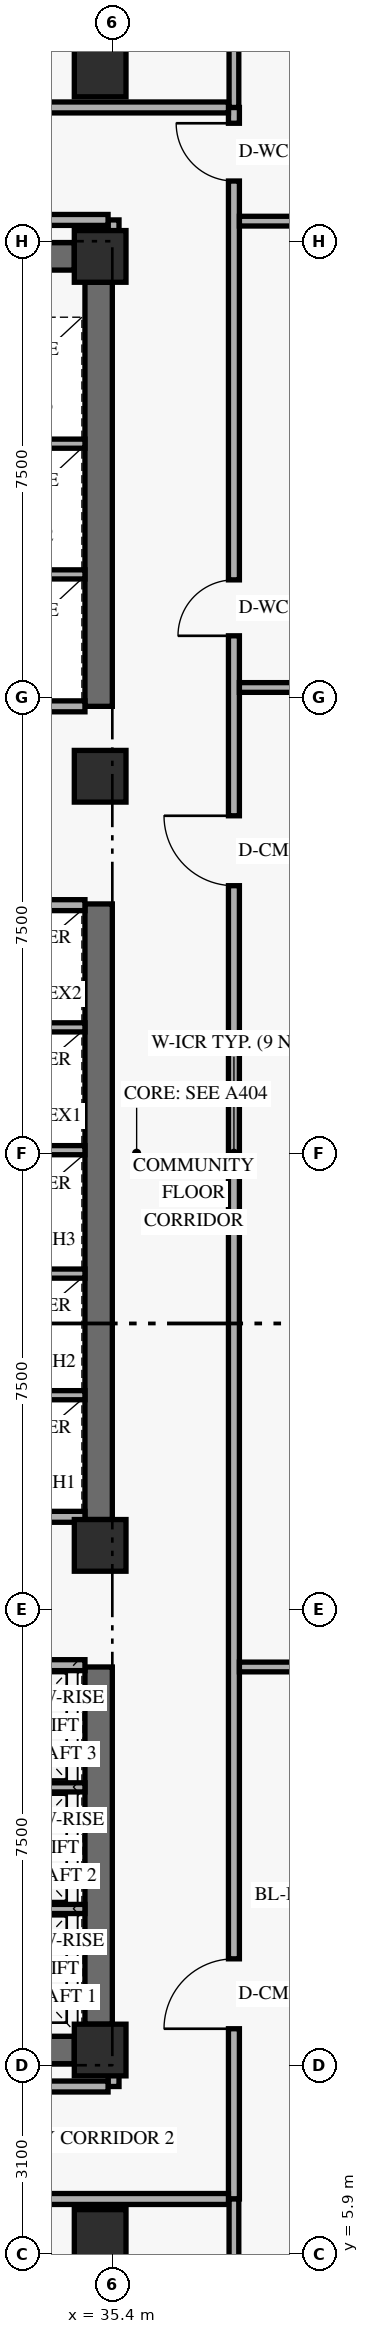
"""IFC4 building model, lengths in metres.
Left out: names, types, materials, properties, quantities, classifications, styles, units other than length and angle.
Written with IfcOpenShell. Run it as: python <this file> out.ifc"""

import sys

from ifc_helpers import new_model, si_unit, direction, frame, frame_2d, origin, origin_2d, place, context, subcontext, project, spatial, rectangle, extrude, element, fill, save


model = new_model("IFC4")
c1 = context("Model", 3, precision=1e-05, world=origin(), true_north=direction((0.0, 1.0)))
c2 = subcontext(c1, "Body", "Model", "MODEL_VIEW")
j1 = project(units=[si_unit("LENGTHUNIT", "METRE"), si_unit("PLANEANGLEUNIT", "RADIAN")], contexts=[c1])
p1 = place(None, origin())
s1 = spatial("IfcSite", under=j1, at=p1, CompositionType="ELEMENT")
p2 = place(p1, origin())
s2 = spatial("IfcBuilding", under=s1, at=p2, CompositionType="ELEMENT")
p3 = place(p2, frame((0.0, 0.0, 60.0)))
s3 = spatial("IfcBuildingStorey", under=s2, at=p3, CompositionType="ELEMENT", Elevation=60.0)
p4 = place(p3, frame((35.175, 9.675, 0.0), z_axis=(0.0, 0.0, 1.0), x_axis=(0.0, 1.0, 0.0)))
e1 = element("IfcWall", 1, at=p4, inside=s3, PredefinedType="SHEAR", context=c2, shape_type="SweptSolid", body=[
    extrude(rectangle(XDim=5.875, YDim=0.45, at=frame_2d((2.938, 0.0))), origin(), (0.0, 0.0, 1.0), 3.267),
])
p5 = place(p3, frame((35.175, 17.975, 0.0), z_axis=(0.0, 0.0, 1.0), x_axis=(0.0, 1.0, 0.0)))
e2 = element("IfcWall", 2, at=p5, inside=s3, PredefinedType="SHEAR", context=c2, shape_type="SweptSolid", body=[
    extrude(rectangle(XDim=10.125, YDim=0.45, at=frame_2d((5.062, 0.0))), origin(), (0.0, 0.0, 1.0), 3.267),
])
p6 = place(p3, frame((35.175, 31.35, 0.0), z_axis=(0.0, 0.0, 1.0), x_axis=(0.0, 1.0, 0.0)))
e3 = element("IfcWall", 3, at=p6, inside=s3, PredefinedType="SHEAR", context=c2, shape_type="SweptSolid", body=[
    extrude(rectangle(XDim=6.975, YDim=0.45, at=frame_2d((3.487, 0.0))), origin(), (0.0, 0.0, 1.0), 3.267),
])
for number, where, z_axis, x_axis in (
    (4, (24.625, 9.25, 0.0), (0.0, 0.0, 1.0), (1.0, 0.0, 0.0)),
    (5, (24.625, 38.75, 0.0), (0.0, 0.0, 1.0), (1.0, 0.0, 0.0)),
):
    element("IfcWall", number, at=place(p3, frame(where, z_axis=z_axis, x_axis=x_axis)), inside=s3, PredefinedType="SHEAR", context=c2, shape_type="SweptSolid", body=[
        extrude(rectangle(XDim=10.15, YDim=0.45, at=frame_2d((5.075, 0.0))), origin(), (0.0, 0.0, 1.0), 3.96),
    ])
for number, where, z_axis, x_axis in (
    (6, (35.2, 6.2, 0.0), (0.0, 0.0, 1.0), (1.0, 0.0, 0.0)),
    (7, (35.2, 9.25, 0.0), (0.0, 0.0, 1.0), (1.0, 0.0, 0.0)),
    (8, (35.2, 17.55, 0.0), (0.0, 0.0, 1.0), (1.0, 0.0, 0.0)),
    (9, (35.2, 30.2, 0.0), (0.0, 0.0, 1.0), (1.0, 0.0, 0.0)),
    (10, (35.2, 38.75, 0.0), (0.0, 0.0, 1.0), (1.0, 0.0, 0.0)),
    (11, (35.2, 41.8, 0.0), (0.0, 0.0, 1.0), (1.0, 0.0, 0.0)),
):
    element("IfcColumn", number, at=place(p3, frame(where, z_axis=z_axis, x_axis=x_axis)), inside=s3, PredefinedType="COLUMN", context=c2, shape_type="SweptSolid", body=[
        extrude(rectangle(XDim=0.85, YDim=0.85, at=origin_2d()), origin(), (0.0, 0.0, 1.0), 4.2),
    ])
p7 = place(p3, frame((32.74, 15.58, 0.0), z_axis=(0.0, 0.0, 1.0), x_axis=(1.0, 0.0, 0.0)))
e12 = element("IfcWall", 12, at=p7, inside=s3, PredefinedType="STANDARD", context=c2, shape_type="SweptSolid", body=[
    extrude(rectangle(XDim=2.21, YDim=0.18, at=frame_2d((1.105, 0.0))), origin(), (0.0, 0.0, 1.0), 3.96),
])
for number, where, z_axis, x_axis in (
    (13, (32.74, 11.57, 0.0), (0.0, 0.0, 1.0), (1.0, 0.0, 0.0)),
    (14, (32.74, 13.57, 0.0), (0.0, 0.0, 1.0), (1.0, 0.0, 0.0)),
):
    element("IfcWall", number, at=place(p3, frame(where, z_axis=z_axis, x_axis=x_axis)), inside=s3, PredefinedType="STANDARD", context=c2, shape_type="SweptSolid", body=[
        extrude(rectangle(XDim=2.21, YDim=0.15, at=frame_2d((1.105, 0.0))), origin(), (0.0, 0.0, 1.0), 3.96),
    ])
for number, where, z_axis, x_axis in (
    (15, (32.74, 18.02, 0.0), (0.0, 0.0, 1.0), (1.0, 0.0, 0.0)),
    (16, (32.74, 28.08, 0.0), (0.0, 0.0, 1.0), (1.0, 0.0, 0.0)),
):
    element("IfcWall", number, at=place(p3, frame(where, z_axis=z_axis, x_axis=x_axis)), inside=s3, PredefinedType="STANDARD", context=c2, shape_type="SweptSolid", body=[
        extrude(rectangle(XDim=2.21, YDim=0.18, at=frame_2d((1.105, 0.0))), origin(), (0.0, 0.0, 1.0), 3.96),
    ])
for number, where, z_axis, x_axis in (
    (17, (32.74, 20.02, 0.0), (0.0, 0.0, 1.0), (1.0, 0.0, 0.0)),
    (18, (32.74, 22.02, 0.0), (0.0, 0.0, 1.0), (1.0, 0.0, 0.0)),
    (19, (32.74, 24.05, 0.0), (0.0, 0.0, 1.0), (1.0, 0.0, 0.0)),
    (20, (32.74, 26.07, 0.0), (0.0, 0.0, 1.0), (1.0, 0.0, 0.0)),
):
    element("IfcWall", number, at=place(p3, frame(where, z_axis=z_axis, x_axis=x_axis)), inside=s3, PredefinedType="STANDARD", context=c2, shape_type="SweptSolid", body=[
        extrude(rectangle(XDim=2.21, YDim=0.15, at=frame_2d((1.105, 0.0))), origin(), (0.0, 0.0, 1.0), 3.96),
    ])
p8 = place(p3, frame((32.74, 31.35, 0.0), z_axis=(0.0, 0.0, 1.0), x_axis=(1.0, 0.0, 0.0)))
e21 = element("IfcWall", 21, at=p8, inside=s3, PredefinedType="STANDARD", context=c2, shape_type="SweptSolid", body=[
    extrude(rectangle(XDim=2.21, YDim=0.18, at=frame_2d((1.105, 0.0))), origin(), (0.0, 0.0, 1.0), 3.96),
])
for number, where, z_axis, x_axis in (
    (22, (32.74, 33.52, 0.0), (0.0, 0.0, 1.0), (1.0, 0.0, 0.0)),
    (23, (32.74, 35.67, 0.0), (0.0, 0.0, 1.0), (1.0, 0.0, 0.0)),
):
    element("IfcWall", number, at=place(p3, frame(where, z_axis=z_axis, x_axis=x_axis)), inside=s3, PredefinedType="STANDARD", context=c2, shape_type="SweptSolid", body=[
        extrude(rectangle(XDim=2.21, YDim=0.15, at=frame_2d((1.105, 0.0))), origin(), (0.0, 0.0, 1.0), 3.96),
    ])
p9 = place(p3, frame((37.4, 6.8, 0.0), z_axis=(0.0, 0.0, 1.0), x_axis=(0.0, 1.0, 0.0)))
e24 = element("IfcWall", 24, at=p9, inside=s3, PredefinedType="STANDARD", context=c2, shape_type="SweptSolid", body=[
    extrude(rectangle(XDim=34.4, YDim=0.18, at=frame_2d((17.2, 0.0))), origin(), (0.0, 0.0, 1.0), 3.249),
])
p10 = place(p9, frame((25.71, 0.0, 0.0)))
e25 = element("IfcOpeningElement", 25, at=p10, cuts=e24, PredefinedType="OPENING", context=c2, shape_type="SweptSolid", body=[
    extrude(rectangle(XDim=0.92, YDim=2.14, at=frame_2d((0.46, 1.07))), frame((0.0, 0.1, 0.0), z_axis=(0.0, -1.0, 0.0), x_axis=(1.0, 0.0, 0.0)), (0.0, 0.0, 1.0), 0.2),
])
p11 = place(p9, frame((33.19, 0.0, 0.0)))
e26 = element("IfcOpeningElement", 26, at=p11, cuts=e24, PredefinedType="OPENING", context=c2, shape_type="SweptSolid", body=[
    extrude(rectangle(XDim=0.95, YDim=2.14, at=frame_2d((0.475, 1.07))), frame((0.0, 0.1, 0.0), z_axis=(0.0, -1.0, 0.0), x_axis=(1.0, 0.0, 0.0)), (0.0, 0.0, 1.0), 0.2),
])
p12 = place(p9, frame((2.8, 0.0, 0.0)))
e27 = element("IfcOpeningElement", 27, at=p12, cuts=e24, PredefinedType="OPENING", context=c2, shape_type="SweptSolid", body=[
    extrude(rectangle(XDim=1.15, YDim=2.15, at=frame_2d((0.575, 1.075))), frame((0.0, 0.1, 0.0), z_axis=(0.0, -1.0, 0.0), x_axis=(1.0, 0.0, 0.0)), (0.0, 0.0, 1.0), 0.2),
])
p13 = place(p9, frame((21.6, 0.0, 0.0)))
e28 = element("IfcOpeningElement", 28, at=p13, cuts=e24, PredefinedType="OPENING", context=c2, shape_type="SweptSolid", body=[
    extrude(rectangle(XDim=1.15, YDim=2.15, at=frame_2d((0.575, 1.075))), frame((0.0, 0.1, 0.0), z_axis=(0.0, -1.0, 0.0), x_axis=(1.0, 0.0, 0.0)), (0.0, 0.0, 1.0), 0.2),
])
for number, where, z_axis, x_axis in (
    (29, (37.4, 1.29, 0.0), (0.0, 0.0, 1.0), (0.0, 1.0, 0.0)),
    (30, (37.4, 41.2, 0.0), (0.0, 0.0, 1.0), (0.0, 1.0, 0.0)),
):
    element("IfcWall", number, at=place(p3, frame(where, z_axis=z_axis, x_axis=x_axis)), inside=s3, PredefinedType="PARTITIONING", context=c2, shape_type="SweptSolid", body=[
        extrude(rectangle(XDim=5.51, YDim=0.16, at=frame_2d((2.755, 0.0))), origin(), (0.0, 0.0, 1.0), 3.409),
    ])
for number, where, z_axis, x_axis in (
    (31, (35.42, 8.65, 0.0), (0.0, 0.0, 1.0), (0.0, 1.0, 0.0)),
    (32, (35.42, 38.75, 0.0), (0.0, 0.0, 1.0), (0.0, 1.0, 0.0)),
):
    element("IfcWall", number, at=place(p3, frame(where, z_axis=z_axis, x_axis=x_axis)), inside=s3, PredefinedType="STANDARD", context=c2, shape_type="SweptSolid", body=[
        extrude(rectangle(XDim=0.6, YDim=0.18, at=frame_2d((0.3, 0.0))), origin(), (0.0, 0.0, 1.0), 3.249),
    ])
for number, where, z_axis, x_axis in (
    (33, (37.49, 15.55, 0.0), (0.0, 0.0, 1.0), (1.0, 0.0, 0.0)),
    (34, (37.49, 31.66, 0.0), (0.0, 0.0, 1.0), (1.0, 0.0, 0.0)),
):
    element("IfcWall", number, at=place(p3, frame(where, z_axis=z_axis, x_axis=x_axis)), inside=s3, PredefinedType="PARTITIONING", context=c2, shape_type="SweptSolid", body=[
        extrude(rectangle(XDim=10.82, YDim=0.16, at=frame_2d((5.41, 0.0))), origin(), (0.0, 0.0, 1.0), 3.249),
    ])
p14 = place(p3, frame((37.49, 39.33, 0.0), z_axis=(0.0, 0.0, 1.0), x_axis=(1.0, 0.0, 0.0)))
e35 = element("IfcWall", 35, at=p14, inside=s3, PredefinedType="PLUMBINGWALL", context=c2, shape_type="SweptSolid", body=[
    extrude(rectangle(XDim=5.93, YDim=0.16, at=frame_2d((2.965, 0.0))), origin(), (0.0, 0.0, 1.0), 3.249),
])
p15 = place(p3, frame((21.74, 6.8, 0.0), z_axis=(0.0, 0.0, 1.0), x_axis=(1.0, 0.0, 0.0)))
e36 = element("IfcWall", 36, at=p15, inside=s3, PredefinedType="STANDARD", context=c2, shape_type="SweptSolid", body=[
    extrude(rectangle(XDim=15.57, YDim=0.18, at=frame_2d((7.785, 0.0))), origin(), (0.0, 0.0, 1.0), 3.249),
])
p16 = place(p15, frame((5.41, 0.0, 0.0)))
e37 = element("IfcOpeningElement", 37, at=p16, cuts=e36, PredefinedType="OPENING", context=c2, shape_type="SweptSolid", body=[
    extrude(rectangle(XDim=0.95, YDim=2.15, at=frame_2d((0.475, 1.075))), frame((0.0, 0.1, 0.0), z_axis=(0.0, -1.0, 0.0), x_axis=(1.0, 0.0, 0.0)), (0.0, 0.0, 1.0), 0.2),
])
p17 = place(p3, frame((23.85, 8.65, 0.0), z_axis=(0.0, 0.0, 1.0), x_axis=(1.0, 0.0, 0.0)))
e38 = element("IfcWall", 38, at=p17, inside=s3, PredefinedType="STANDARD", context=c2, shape_type="SweptSolid", body=[
    extrude(rectangle(XDim=11.48, YDim=0.18, at=frame_2d((5.74, 0.0))), origin(), (0.0, 0.0, 1.0), 3.249),
])
p18 = place(p3, frame((21.74, 41.2, 0.0), z_axis=(0.0, 0.0, 1.0), x_axis=(1.0, 0.0, 0.0)))
e39 = element("IfcWall", 39, at=p18, inside=s3, PredefinedType="STANDARD", context=c2, shape_type="SweptSolid", body=[
    extrude(rectangle(XDim=15.57, YDim=0.18, at=frame_2d((7.785, 0.0))), origin(), (0.0, 0.0, 1.0), 3.249),
])
p19 = place(p18, frame((5.41, 0.0, 0.0)))
e40 = element("IfcOpeningElement", 40, at=p19, cuts=e39, PredefinedType="OPENING", context=c2, shape_type="SweptSolid", body=[
    extrude(rectangle(XDim=0.95, YDim=2.15, at=frame_2d((0.475, 1.075))), frame((0.0, 0.1, 0.0), z_axis=(0.0, -1.0, 0.0), x_axis=(1.0, 0.0, 0.0)), (0.0, 0.0, 1.0), 0.2),
])
p20 = place(p3, frame((23.85, 39.35, 0.0), z_axis=(0.0, 0.0, 1.0), x_axis=(1.0, 0.0, 0.0)))
e41 = element("IfcWall", 41, at=p20, inside=s3, PredefinedType="STANDARD", context=c2, shape_type="SweptSolid", body=[
    extrude(rectangle(XDim=11.48, YDim=0.18, at=frame_2d((5.74, 0.0))), origin(), (0.0, 0.0, 1.0), 3.249),
])
p21 = place(p10, origin())
e42 = element("IfcDoor", 42, at=p21, inside=s3, OperationType="SINGLE_SWING_LEFT", PredefinedType="DOOR", context=c2, shape_type="SweptSolid", body=[
    extrude(rectangle(XDim=0.92, YDim=2.14, at=frame_2d((0.46, 1.07))), frame((0.0, 0.025, 0.0), z_axis=(0.0, -1.0, 0.0), x_axis=(1.0, 0.0, 0.0)), (0.0, 0.0, 1.0), 0.05),
])
fill(e25, e42)
p22 = place(p11, origin())
e43 = element("IfcDoor", 43, at=p22, inside=s3, OperationType="SINGLE_SWING_RIGHT", PredefinedType="DOOR", context=c2, shape_type="SweptSolid", body=[
    extrude(rectangle(XDim=0.95, YDim=2.14, at=frame_2d((0.475, 1.07))), frame((0.0, 0.025, 0.0), z_axis=(0.0, -1.0, 0.0), x_axis=(1.0, 0.0, 0.0)), (0.0, 0.0, 1.0), 0.05),
])
fill(e26, e43)
p23 = place(p12, origin())
e44 = element("IfcDoor", 44, at=p23, inside=s3, OperationType="SINGLE_SWING_LEFT", PredefinedType="DOOR", context=c2, shape_type="SweptSolid", body=[
    extrude(rectangle(XDim=1.15, YDim=2.15, at=frame_2d((0.575, 1.075))), frame((0.0, 0.025, 0.0), z_axis=(0.0, -1.0, 0.0), x_axis=(1.0, 0.0, 0.0)), (0.0, 0.0, 1.0), 0.05),
])
fill(e27, e44)
p24 = place(p13, origin())
e45 = element("IfcDoor", 45, at=p24, inside=s3, OperationType="SINGLE_SWING_RIGHT", PredefinedType="DOOR", context=c2, shape_type="SweptSolid", body=[
    extrude(rectangle(XDim=1.15, YDim=2.15, at=frame_2d((0.575, 1.075))), frame((0.0, 0.025, 0.0), z_axis=(0.0, -1.0, 0.0), x_axis=(1.0, 0.0, 0.0)), (0.0, 0.0, 1.0), 0.05),
])
fill(e28, e45)
save(model, sys.argv[1])
